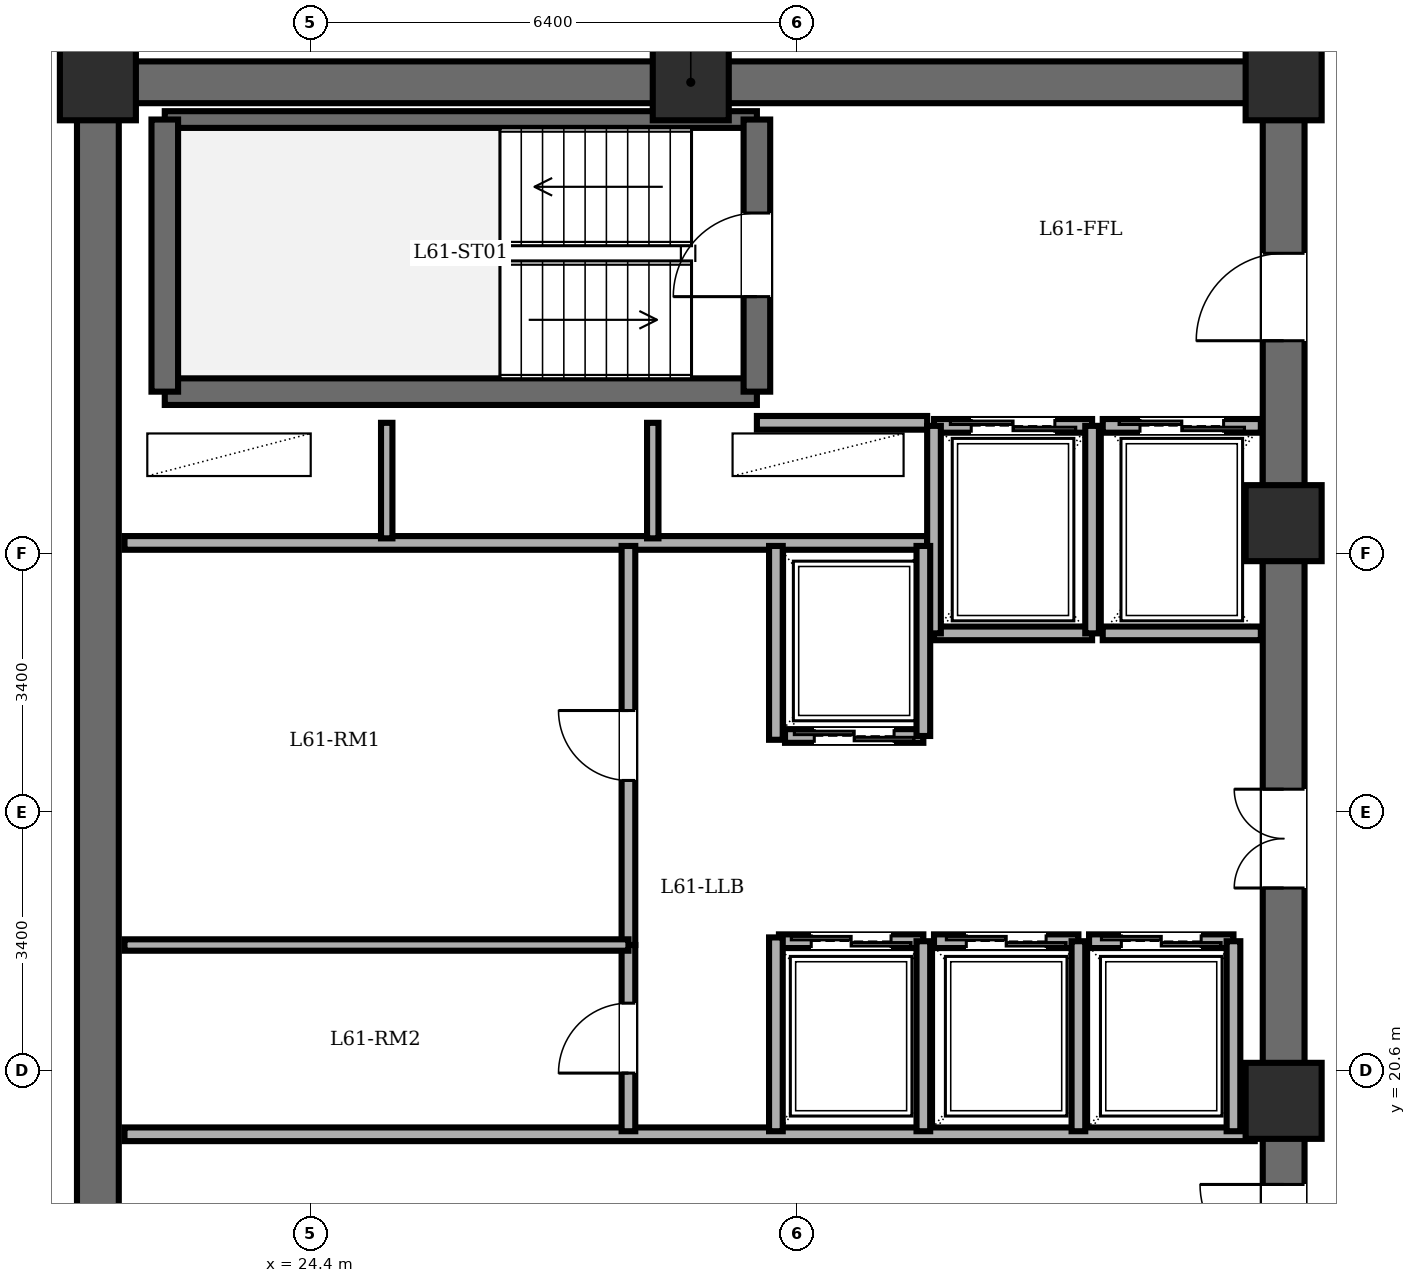
"""IFC4 building model, lengths in metres.
Left out: names, types, materials, properties, quantities, classifications, styles, units other than length and angle.
Written with IfcOpenShell. Run it as: python <this file> out.ifc"""

import sys

from ifc_helpers import new_model, si_unit, direction, frame, frame_2d, origin, origin_2d, place, context, subcontext, project, spatial, rectangle, extrude, element, fill, save


model = new_model("IFC4")
c1 = context("Model", 3, precision=1e-05, world=origin(), true_north=direction((0.0, 1.0)))
c2 = subcontext(c1, "Body", "Model", "MODEL_VIEW")
j1 = project(units=[si_unit("LENGTHUNIT", "METRE"), si_unit("PLANEANGLEUNIT", "RADIAN")], contexts=[c1])
p1 = place(None, origin())
s1 = spatial("IfcSite", under=j1, at=p1, CompositionType="ELEMENT")
p2 = place(p1, origin())
s2 = spatial("IfcBuilding", under=s1, at=p2, CompositionType="ELEMENT")
p3 = place(p2, frame((0.0, 0.0, 233.7)))
s3 = spatial("IfcBuildingStorey", under=s2, at=p3, CompositionType="ELEMENT", Elevation=233.7)
for number, where, z_axis, x_axis in (
    (1, (37.2, 20.2, 0.0), (0.0, 0.0, 1.0), (1.0, 0.0, 0.0)),
    (2, (37.2, 27.8, 0.0), (0.0, 0.0, 1.0), (1.0, 0.0, 0.0)),
    (3, (37.2, 33.6, 0.0), (0.0, 0.0, 1.0), (1.0, 0.0, 0.0)),
    (4, (29.4, 33.6, 0.0), (0.0, 0.0, 1.0), (1.0, 0.0, 0.0)),
    (5, (21.6, 33.6, 0.0), (0.0, 0.0, 1.0), (1.0, 0.0, 0.0)),
):
    element("IfcColumn", number, at=place(p3, frame(where, z_axis=z_axis, x_axis=x_axis)), inside=s3, PredefinedType="COLUMN", context=c2, shape_type="SweptSolid", body=[
        extrude(rectangle(XDim=1.0, YDim=1.0, at=origin_2d()), origin(), (0.0, 0.0, 1.0), 3.6),
    ])
p4 = place(p3, frame((21.6, 14.4, 0.0), z_axis=(0.0, 0.0, 1.0), x_axis=(0.0, 1.0, 0.0)))
e6 = element("IfcWall", 6, at=p4, inside=s3, PredefinedType="SHEAR", context=c2, shape_type="SweptSolid", body=[
    extrude(rectangle(XDim=19.2, YDim=0.55, at=frame_2d((9.6, 0.0))), origin(), (0.0, 0.0, 1.0), 3.4),
])
p5 = place(p3, frame((21.6, 33.6, 0.0), z_axis=(0.0, 0.0, 1.0), x_axis=(1.0, 0.0, 0.0)))
e7 = element("IfcWall", 7, at=p5, inside=s3, PredefinedType="SHEAR", context=c2, shape_type="SweptSolid", body=[
    extrude(rectangle(XDim=15.6, YDim=0.55, at=frame_2d((7.8, 0.0))), origin(), (0.0, 0.0, 1.0), 3.4),
])
p6 = place(p3, frame((37.2, 14.4, 0.0), z_axis=(0.0, 0.0, 1.0), x_axis=(0.0, 1.0, 0.0)))
e8 = element("IfcWall", 8, at=p6, inside=s3, PredefinedType="SHEAR", context=c2, shape_type="SweptSolid", body=[
    extrude(rectangle(XDim=19.2, YDim=0.55, at=frame_2d((9.6, 0.0))), origin(), (0.0, 0.0, 1.0), 3.4),
])
p7 = place(p6, frame((15.8, 0.0, 0.0)))
e9 = element("IfcOpeningElement", 9, at=p7, cuts=e8, PredefinedType="OPENING", context=c2, shape_type="SweptSolid", body=[
    extrude(rectangle(XDim=1.15, YDim=2.15, at=frame_2d((0.575, 1.075))), frame((0.0, 0.285, 0.0), z_axis=(0.0, -1.0, 0.0), x_axis=(1.0, 0.0, 0.0)), (0.0, 0.0, 1.0), 0.57),
])
p8 = place(p6, frame((3.6, 0.0, 0.0)))
e10 = element("IfcOpeningElement", 10, at=p8, cuts=e8, PredefinedType="OPENING", context=c2, shape_type="SweptSolid", body=[
    extrude(rectangle(XDim=1.1, YDim=2.15, at=frame_2d((0.55, 1.075))), frame((0.0, 0.285, 0.0), z_axis=(0.0, -1.0, 0.0), x_axis=(1.0, 0.0, 0.0)), (0.0, 0.0, 1.0), 0.57),
])
p9 = place(p6, frame((8.6, 0.0, 0.0)))
e11 = element("IfcOpeningElement", 11, at=p9, cuts=e8, PredefinedType="OPENING", context=c2, shape_type="SweptSolid", body=[
    extrude(rectangle(XDim=1.3, YDim=2.2, at=frame_2d((0.65, 1.1))), frame((0.0, 0.285, 0.0), z_axis=(0.0, -1.0, 0.0), x_axis=(1.0, 0.0, 0.0)), (0.0, 0.0, 1.0), 0.57),
])
p10 = place(p3, frame((22.48, 29.53, 0.0), z_axis=(0.0, 0.0, 1.0), x_axis=(1.0, 0.0, 0.0)))
e12 = element("IfcWall", 12, at=p10, inside=s3, PredefinedType="SOLIDWALL", context=c2, shape_type="SweptSolid", body=[
    extrude(rectangle(XDim=7.79, YDim=0.35, at=frame_2d((3.895, 0.0))), origin(), (0.0, 0.0, 1.0), 3.4),
])
p11 = place(p3, frame((22.48, 33.11, 0.0), z_axis=(0.0, 0.0, 1.0), x_axis=(1.0, 0.0, 0.0)))
e13 = element("IfcWall", 13, at=p11, inside=s3, PredefinedType="PARTITIONING", context=c2, shape_type="SweptSolid", body=[
    extrude(rectangle(XDim=7.79, YDim=0.22, at=frame_2d((3.895, 0.0))), origin(), (0.0, 0.0, 1.0), 3.4),
])
p12 = place(p3, frame((22.48, 29.53, 0.0), z_axis=(0.0, 0.0, 1.0), x_axis=(0.0, 1.0, 0.0)))
e14 = element("IfcWall", 14, at=p12, inside=s3, PredefinedType="SOLIDWALL", context=c2, shape_type="SweptSolid", body=[
    extrude(rectangle(XDim=3.58, YDim=0.35, at=frame_2d((1.79, 0.0))), origin(), (0.0, 0.0, 1.0), 3.4),
])
p13 = place(p3, frame((30.27, 29.53, 0.0), z_axis=(0.0, 0.0, 1.0), x_axis=(0.0, 1.0, 0.0)))
e15 = element("IfcWall", 15, at=p13, inside=s3, PredefinedType="SOLIDWALL", context=c2, shape_type="SweptSolid", body=[
    extrude(rectangle(XDim=3.58, YDim=0.35, at=frame_2d((1.79, 0.0))), origin(), (0.0, 0.0, 1.0), 3.4),
])
p14 = place(p13, frame((1.25, 0.0, 0.0)))
e16 = element("IfcOpeningElement", 16, at=p14, cuts=e15, PredefinedType="OPENING", context=c2, shape_type="SweptSolid", body=[
    extrude(rectangle(XDim=1.1, YDim=2.15, at=frame_2d((0.55, 1.075))), frame((0.0, 0.185, 0.0), z_axis=(0.0, -1.0, 0.0), x_axis=(1.0, 0.0, 0.0)), (0.0, 0.0, 1.0), 0.37),
])
p15 = place(p3, frame((30.27, 29.12, 0.0), z_axis=(0.0, 0.0, 1.0), x_axis=(1.0, 0.0, 0.0)))
e17 = element("IfcWall", 17, at=p15, inside=s3, PredefinedType="PARTITIONING", context=c2, shape_type="SweptSolid", body=[
    extrude(rectangle(XDim=2.24, YDim=0.18, at=frame_2d((1.12, 0.0))), origin(), (0.0, 0.0, 1.0), 3.4),
])
p16 = place(p3, frame((21.95, 27.54, 0.0), z_axis=(0.0, 0.0, 1.0), x_axis=(1.0, 0.0, 0.0)))
e18 = element("IfcWall", 18, at=p16, inside=s3, PredefinedType="PARTITIONING", context=c2, shape_type="SweptSolid", body=[
    extrude(rectangle(XDim=10.56, YDim=0.18, at=frame_2d((5.28, 0.0))), origin(), (0.0, 0.0, 1.0), 3.4),
])
for number, where, z_axis, x_axis in (
    (19, (25.4, 27.6, 0.0), (0.0, 0.0, 1.0), (0.0, 1.0, 0.0)),
    (20, (28.9, 27.6, 0.0), (0.0, 0.0, 1.0), (0.0, 1.0, 0.0)),
):
    element("IfcWall", number, at=place(p3, frame(where, z_axis=z_axis, x_axis=x_axis)), inside=s3, PredefinedType="PARTITIONING", context=c2, shape_type="SweptSolid", body=[
        extrude(rectangle(XDim=1.52, YDim=0.15, at=frame_2d((0.76, 0.0))), origin(), (0.0, 0.0, 1.0), 3.4),
    ])
p17 = place(p3, frame((21.95, 19.76, 0.0), z_axis=(0.0, 0.0, 1.0), x_axis=(1.0, 0.0, 0.0)))
e21 = element("IfcWall", 21, at=p17, inside=s3, PredefinedType="PARTITIONING", context=c2, shape_type="SweptSolid", body=[
    extrude(rectangle(XDim=14.87, YDim=0.18, at=frame_2d((7.435, 0.0))), origin(), (0.0, 0.0, 1.0), 3.4),
])
p18 = place(p3, frame((32.6, 29.08, 0.0), z_axis=(0.0, 0.0, 1.0), x_axis=(1.0, 0.0, 0.0)))
e22 = element("IfcWall", 22, at=p18, inside=s3, PredefinedType="PARTITIONING", context=c2, shape_type="SweptSolid", body=[
    extrude(rectangle(XDim=2.08, YDim=0.18, at=frame_2d((1.04, 0.0))), origin(), (0.0, 0.0, 1.0), 3.4),
])
p19 = place(p18, frame((0.49, 0.0, 0.0)))
e23 = element("IfcOpeningElement", 23, at=p19, cuts=e22, PredefinedType="OPENING", context=c2, shape_type="SweptSolid", body=[
    extrude(rectangle(XDim=1.1, YDim=2.2, at=frame_2d((0.55, 1.1))), frame((0.0, 0.1, 0.0), z_axis=(0.0, -1.0, 0.0), x_axis=(1.0, 0.0, 0.0)), (0.0, 0.0, 1.0), 0.2),
])
p20 = place(p3, frame((34.68, 26.35, 0.0), z_axis=(0.0, 0.0, 1.0), x_axis=(-1.0, 0.0, 0.0)))
e24 = element("IfcWall", 24, at=p20, inside=s3, PredefinedType="PARTITIONING", context=c2, shape_type="SweptSolid", body=[
    extrude(rectangle(XDim=2.08, YDim=0.18, at=frame_2d((1.04, 0.0))), origin(), (0.0, 0.0, 1.0), 3.4),
])
for number, where, z_axis, x_axis in (
    (25, (34.68, 26.35, 0.0), (0.0, 0.0, 1.0), (0.0, 1.0, 0.0)),
    (26, (32.6, 29.08, 0.0), (0.0, 0.0, 1.0), (0.0, -1.0, 0.0)),
):
    element("IfcWall", number, at=place(p3, frame(where, z_axis=z_axis, x_axis=x_axis)), inside=s3, PredefinedType="PARTITIONING", context=c2, shape_type="SweptSolid", body=[
        extrude(rectangle(XDim=2.73, YDim=0.18, at=frame_2d((1.365, 0.0))), origin(), (0.0, 0.0, 1.0), 3.4),
    ])
p21 = place(p3, frame((34.82, 29.08, 0.0), z_axis=(0.0, 0.0, 1.0), x_axis=(1.0, 0.0, 0.0)))
e27 = element("IfcWall", 27, at=p21, inside=s3, PredefinedType="PARTITIONING", context=c2, shape_type="SweptSolid", body=[
    extrude(rectangle(XDim=2.08, YDim=0.18, at=frame_2d((1.04, 0.0))), origin(), (0.0, 0.0, 1.0), 3.4),
])
p22 = place(p21, frame((0.49, 0.0, 0.0)))
e28 = element("IfcOpeningElement", 28, at=p22, cuts=e27, PredefinedType="OPENING", context=c2, shape_type="SweptSolid", body=[
    extrude(rectangle(XDim=1.1, YDim=2.2, at=frame_2d((0.55, 1.1))), frame((0.0, 0.1, 0.0), z_axis=(0.0, -1.0, 0.0), x_axis=(1.0, 0.0, 0.0)), (0.0, 0.0, 1.0), 0.2),
])
p23 = place(p3, frame((36.9, 26.35, 0.0), z_axis=(0.0, 0.0, 1.0), x_axis=(-1.0, 0.0, 0.0)))
e29 = element("IfcWall", 29, at=p23, inside=s3, PredefinedType="PARTITIONING", context=c2, shape_type="SweptSolid", body=[
    extrude(rectangle(XDim=2.08, YDim=0.18, at=frame_2d((1.04, 0.0))), origin(), (0.0, 0.0, 1.0), 3.4),
])
p24 = place(p3, frame((32.46, 25.0, 0.0), z_axis=(0.0, 0.0, 1.0), x_axis=(-1.0, 0.0, 0.0)))
e30 = element("IfcWall", 30, at=p24, inside=s3, PredefinedType="PARTITIONING", context=c2, shape_type="SweptSolid", body=[
    extrude(rectangle(XDim=1.82, YDim=0.18, at=frame_2d((0.91, 0.0))), origin(), (0.0, 0.0, 1.0), 3.4),
])
p25 = place(p24, frame((0.385, 0.0, 0.0)))
e31 = element("IfcOpeningElement", 31, at=p25, cuts=e30, PredefinedType="OPENING", context=c2, shape_type="SweptSolid", body=[
    extrude(rectangle(XDim=1.05, YDim=2.2, at=frame_2d((0.525, 1.1))), frame((0.0, 0.1, 0.0), z_axis=(0.0, -1.0, 0.0), x_axis=(1.0, 0.0, 0.0)), (0.0, 0.0, 1.0), 0.2),
])
p26 = place(p3, frame((32.46, 25.0, 0.0), z_axis=(0.0, 0.0, 1.0), x_axis=(0.0, 1.0, 0.0)))
e32 = element("IfcWall", 32, at=p26, inside=s3, PredefinedType="PARTITIONING", context=c2, shape_type="SweptSolid", body=[
    extrude(rectangle(XDim=2.5, YDim=0.18, at=frame_2d((1.25, 0.0))), origin(), (0.0, 0.0, 1.0), 3.4),
])
p27 = place(p3, frame((30.56, 22.3, 0.0), z_axis=(0.0, 0.0, 1.0), x_axis=(1.0, 0.0, 0.0)))
e33 = element("IfcWall", 33, at=p27, inside=s3, PredefinedType="PARTITIONING", context=c2, shape_type="SweptSolid", body=[
    extrude(rectangle(XDim=1.9, YDim=0.18, at=frame_2d((0.95, 0.0))), origin(), (0.0, 0.0, 1.0), 3.4),
])
p28 = place(p27, frame((0.425, 0.0, 0.0)))
e34 = element("IfcOpeningElement", 34, at=p28, cuts=e33, PredefinedType="OPENING", context=c2, shape_type="SweptSolid", body=[
    extrude(rectangle(XDim=1.05, YDim=2.2, at=frame_2d((0.525, 1.1))), frame((0.0, 0.1, 0.0), z_axis=(0.0, -1.0, 0.0), x_axis=(1.0, 0.0, 0.0)), (0.0, 0.0, 1.0), 0.2),
])
p29 = place(p3, frame((32.46, 19.8, 0.0), z_axis=(0.0, 0.0, 1.0), x_axis=(0.0, 1.0, 0.0)))
e35 = element("IfcWall", 35, at=p29, inside=s3, PredefinedType="PARTITIONING", context=c2, shape_type="SweptSolid", body=[
    extrude(rectangle(XDim=2.5, YDim=0.18, at=frame_2d((1.25, 0.0))), origin(), (0.0, 0.0, 1.0), 3.4),
])
p30 = place(p3, frame((32.6, 22.3, 0.0), z_axis=(0.0, 0.0, 1.0), x_axis=(1.0, 0.0, 0.0)))
e36 = element("IfcWall", 36, at=p30, inside=s3, PredefinedType="PARTITIONING", context=c2, shape_type="SweptSolid", body=[
    extrude(rectangle(XDim=1.9, YDim=0.18, at=frame_2d((0.95, 0.0))), origin(), (0.0, 0.0, 1.0), 3.4),
])
p31 = place(p30, frame((0.425, 0.0, 0.0)))
e37 = element("IfcOpeningElement", 37, at=p31, cuts=e36, PredefinedType="OPENING", context=c2, shape_type="SweptSolid", body=[
    extrude(rectangle(XDim=1.05, YDim=2.2, at=frame_2d((0.525, 1.1))), frame((0.0, 0.1, 0.0), z_axis=(0.0, -1.0, 0.0), x_axis=(1.0, 0.0, 0.0)), (0.0, 0.0, 1.0), 0.2),
])
p32 = place(p3, frame((34.5, 19.8, 0.0), z_axis=(0.0, 0.0, 1.0), x_axis=(0.0, 1.0, 0.0)))
e38 = element("IfcWall", 38, at=p32, inside=s3, PredefinedType="PARTITIONING", context=c2, shape_type="SweptSolid", body=[
    extrude(rectangle(XDim=2.5, YDim=0.18, at=frame_2d((1.25, 0.0))), origin(), (0.0, 0.0, 1.0), 3.4),
])
p33 = place(p3, frame((34.64, 22.3, 0.0), z_axis=(0.0, 0.0, 1.0), x_axis=(1.0, 0.0, 0.0)))
e39 = element("IfcWall", 39, at=p33, inside=s3, PredefinedType="PARTITIONING", context=c2, shape_type="SweptSolid", body=[
    extrude(rectangle(XDim=1.9, YDim=0.18, at=frame_2d((0.95, 0.0))), origin(), (0.0, 0.0, 1.0), 3.4),
])
p34 = place(p33, frame((0.425, 0.0, 0.0)))
e40 = element("IfcOpeningElement", 40, at=p34, cuts=e39, PredefinedType="OPENING", context=c2, shape_type="SweptSolid", body=[
    extrude(rectangle(XDim=1.05, YDim=2.2, at=frame_2d((0.525, 1.1))), frame((0.0, 0.1, 0.0), z_axis=(0.0, -1.0, 0.0), x_axis=(1.0, 0.0, 0.0)), (0.0, 0.0, 1.0), 0.2),
])
p35 = place(p3, frame((36.54, 19.8, 0.0), z_axis=(0.0, 0.0, 1.0), x_axis=(0.0, 1.0, 0.0)))
e41 = element("IfcWall", 41, at=p35, inside=s3, PredefinedType="PARTITIONING", context=c2, shape_type="SweptSolid", body=[
    extrude(rectangle(XDim=2.5, YDim=0.18, at=frame_2d((1.25, 0.0))), origin(), (0.0, 0.0, 1.0), 3.4),
])
for number, where, z_axis, x_axis in (
    (42, (30.52, 24.95, 0.0), (0.0, 0.0, 1.0), (0.0, 1.0, 0.0)),
    (43, (30.52, 19.8, 0.0), (0.0, 0.0, 1.0), (0.0, 1.0, 0.0)),
):
    element("IfcWall", number, at=place(p3, frame(where, z_axis=z_axis, x_axis=x_axis)), inside=s3, PredefinedType="PARTITIONING", context=c2, shape_type="SweptSolid", body=[
        extrude(rectangle(XDim=2.55, YDim=0.18, at=frame_2d((1.275, 0.0))), origin(), (0.0, 0.0, 1.0), 3.4),
    ])
p36 = place(p3, frame((28.58, 22.25, 0.0), z_axis=(0.0, 0.0, 1.0), x_axis=(0.0, 1.0, 0.0)))
e44 = element("IfcWall", 44, at=p36, inside=s3, PredefinedType="PARTITIONING", context=c2, shape_type="SweptSolid", body=[
    extrude(rectangle(XDim=5.25, YDim=0.18, at=frame_2d((2.625, 0.0))), origin(), (0.0, 0.0, 1.0), 3.4),
])
p37 = place(p36, frame((2.165, 0.0, 0.0)))
e45 = element("IfcOpeningElement", 45, at=p37, cuts=e44, PredefinedType="OPENING", context=c2, shape_type="SweptSolid", body=[
    extrude(rectangle(XDim=0.92, YDim=2.1, at=frame_2d((0.46, 1.05))), frame((0.0, 0.1, 0.0), z_axis=(0.0, -1.0, 0.0), x_axis=(1.0, 0.0, 0.0)), (0.0, 0.0, 1.0), 0.2),
])
p38 = place(p3, frame((28.58, 19.8, 0.0), z_axis=(0.0, 0.0, 1.0), x_axis=(0.0, 1.0, 0.0)))
e46 = element("IfcWall", 46, at=p38, inside=s3, PredefinedType="PARTITIONING", context=c2, shape_type="SweptSolid", body=[
    extrude(rectangle(XDim=2.45, YDim=0.18, at=frame_2d((1.225, 0.0))), origin(), (0.0, 0.0, 1.0), 3.4),
])
p39 = place(p38, frame((0.765, 0.0, 0.0)))
e47 = element("IfcOpeningElement", 47, at=p39, cuts=e46, PredefinedType="OPENING", context=c2, shape_type="SweptSolid", body=[
    extrude(rectangle(XDim=0.92, YDim=2.1, at=frame_2d((0.46, 1.05))), frame((0.0, 0.1, 0.0), z_axis=(0.0, -1.0, 0.0), x_axis=(1.0, 0.0, 0.0)), (0.0, 0.0, 1.0), 0.2),
])
p40 = place(p3, frame((21.95, 22.25, 0.0), z_axis=(0.0, 0.0, 1.0), x_axis=(1.0, 0.0, 0.0)))
e48 = element("IfcWall", 48, at=p40, inside=s3, PredefinedType="PARTITIONING", context=c2, shape_type="SweptSolid", body=[
    extrude(rectangle(XDim=6.63, YDim=0.15, at=frame_2d((3.315, 0.0))), origin(), (0.0, 0.0, 1.0), 3.4),
])
p41 = place(p14, origin())
e49 = element("IfcDoor", 49, at=p41, inside=s3, OperationType="SINGLE_SWING_LEFT", PredefinedType="DOOR", context=c2, shape_type="SweptSolid", body=[
    extrude(rectangle(XDim=1.1, YDim=2.15, at=frame_2d((0.55, 1.075))), frame((0.0, 0.025, 0.0), z_axis=(0.0, -1.0, 0.0), x_axis=(1.0, 0.0, 0.0)), (0.0, 0.0, 1.0), 0.05),
])
fill(e16, e49)
p42 = place(p7, origin())
e50 = element("IfcDoor", 50, at=p42, inside=s3, OperationType="SINGLE_SWING_LEFT", PredefinedType="DOOR", context=c2, shape_type="SweptSolid", body=[
    extrude(rectangle(XDim=1.15, YDim=2.15, at=frame_2d((0.575, 1.075))), frame((0.0, 0.025, 0.0), z_axis=(0.0, -1.0, 0.0), x_axis=(1.0, 0.0, 0.0)), (0.0, 0.0, 1.0), 0.05),
])
fill(e9, e50)
p43 = place(p8, origin())
e51 = element("IfcDoor", 51, at=p43, inside=s3, OperationType="SINGLE_SWING_RIGHT", PredefinedType="DOOR", context=c2, shape_type="SweptSolid", body=[
    extrude(rectangle(XDim=1.1, YDim=2.15, at=frame_2d((0.55, 1.075))), frame((0.0, 0.025, 0.0), z_axis=(0.0, -1.0, 0.0), x_axis=(1.0, 0.0, 0.0)), (0.0, 0.0, 1.0), 0.05),
])
fill(e10, e51)
p44 = place(p19, origin())
e52 = element("IfcDoor", 52, at=p44, inside=s3, OperationType="DOUBLE_DOOR_SLIDING", PredefinedType="DOOR", context=c2, shape_type="SweptSolid", body=[
    extrude(rectangle(XDim=1.1, YDim=2.2, at=frame_2d((0.55, 1.1))), frame((0.0, 0.025, 0.0), z_axis=(0.0, -1.0, 0.0), x_axis=(1.0, 0.0, 0.0)), (0.0, 0.0, 1.0), 0.05),
])
fill(e23, e52)
p45 = place(p22, origin())
e53 = element("IfcDoor", 53, at=p45, inside=s3, OperationType="DOUBLE_DOOR_SLIDING", PredefinedType="DOOR", context=c2, shape_type="SweptSolid", body=[
    extrude(rectangle(XDim=1.1, YDim=2.2, at=frame_2d((0.55, 1.1))), frame((0.0, 0.025, 0.0), z_axis=(0.0, -1.0, 0.0), x_axis=(1.0, 0.0, 0.0)), (0.0, 0.0, 1.0), 0.05),
])
fill(e28, e53)
p46 = place(p25, origin())
e54 = element("IfcDoor", 54, at=p46, inside=s3, OperationType="DOUBLE_DOOR_SLIDING", PredefinedType="DOOR", context=c2, shape_type="SweptSolid", body=[
    extrude(rectangle(XDim=1.05, YDim=2.2, at=frame_2d((0.525, 1.1))), frame((0.0, 0.025, 0.0), z_axis=(0.0, -1.0, 0.0), x_axis=(1.0, 0.0, 0.0)), (0.0, 0.0, 1.0), 0.05),
])
fill(e31, e54)
p47 = place(p28, origin())
e55 = element("IfcDoor", 55, at=p47, inside=s3, OperationType="DOUBLE_DOOR_SLIDING", PredefinedType="DOOR", context=c2, shape_type="SweptSolid", body=[
    extrude(rectangle(XDim=1.05, YDim=2.2, at=frame_2d((0.525, 1.1))), frame((0.0, 0.025, 0.0), z_axis=(0.0, -1.0, 0.0), x_axis=(1.0, 0.0, 0.0)), (0.0, 0.0, 1.0), 0.05),
])
fill(e34, e55)
p48 = place(p31, origin())
e56 = element("IfcDoor", 56, at=p48, inside=s3, OperationType="DOUBLE_DOOR_SLIDING", PredefinedType="DOOR", context=c2, shape_type="SweptSolid", body=[
    extrude(rectangle(XDim=1.05, YDim=2.2, at=frame_2d((0.525, 1.1))), frame((0.0, 0.025, 0.0), z_axis=(0.0, -1.0, 0.0), x_axis=(1.0, 0.0, 0.0)), (0.0, 0.0, 1.0), 0.05),
])
fill(e37, e56)
p49 = place(p34, origin())
e57 = element("IfcDoor", 57, at=p49, inside=s3, OperationType="DOUBLE_DOOR_SLIDING", PredefinedType="DOOR", context=c2, shape_type="SweptSolid", body=[
    extrude(rectangle(XDim=1.05, YDim=2.2, at=frame_2d((0.525, 1.1))), frame((0.0, 0.025, 0.0), z_axis=(0.0, -1.0, 0.0), x_axis=(1.0, 0.0, 0.0)), (0.0, 0.0, 1.0), 0.05),
])
fill(e40, e57)
p50 = place(p37, origin())
e58 = element("IfcDoor", 58, at=p50, inside=s3, OperationType="SINGLE_SWING_RIGHT", PredefinedType="DOOR", context=c2, shape_type="SweptSolid", body=[
    extrude(rectangle(XDim=0.92, YDim=2.1, at=frame_2d((0.46, 1.05))), frame((0.0, 0.025, 0.0), z_axis=(0.0, -1.0, 0.0), x_axis=(1.0, 0.0, 0.0)), (0.0, 0.0, 1.0), 0.05),
])
fill(e45, e58)
p51 = place(p39, origin())
e59 = element("IfcDoor", 59, at=p51, inside=s3, OperationType="SINGLE_SWING_LEFT", PredefinedType="DOOR", context=c2, shape_type="SweptSolid", body=[
    extrude(rectangle(XDim=0.92, YDim=2.1, at=frame_2d((0.46, 1.05))), frame((0.0, 0.025, 0.0), z_axis=(0.0, -1.0, 0.0), x_axis=(1.0, 0.0, 0.0)), (0.0, 0.0, 1.0), 0.05),
])
fill(e47, e59)
p52 = place(p9, origin())
e60 = element("IfcDoor", 60, at=p52, inside=s3, OperationType="DOUBLE_DOOR_SINGLE_SWING", PredefinedType="DOOR", context=c2, shape_type="SweptSolid", body=[
    extrude(rectangle(XDim=1.3, YDim=2.2, at=frame_2d((0.65, 1.1))), frame((0.0, 0.025, 0.0), z_axis=(0.0, -1.0, 0.0), x_axis=(1.0, 0.0, 0.0)), (0.0, 0.0, 1.0), 0.05),
])
fill(e11, e60)
save(model, sys.argv[1])
